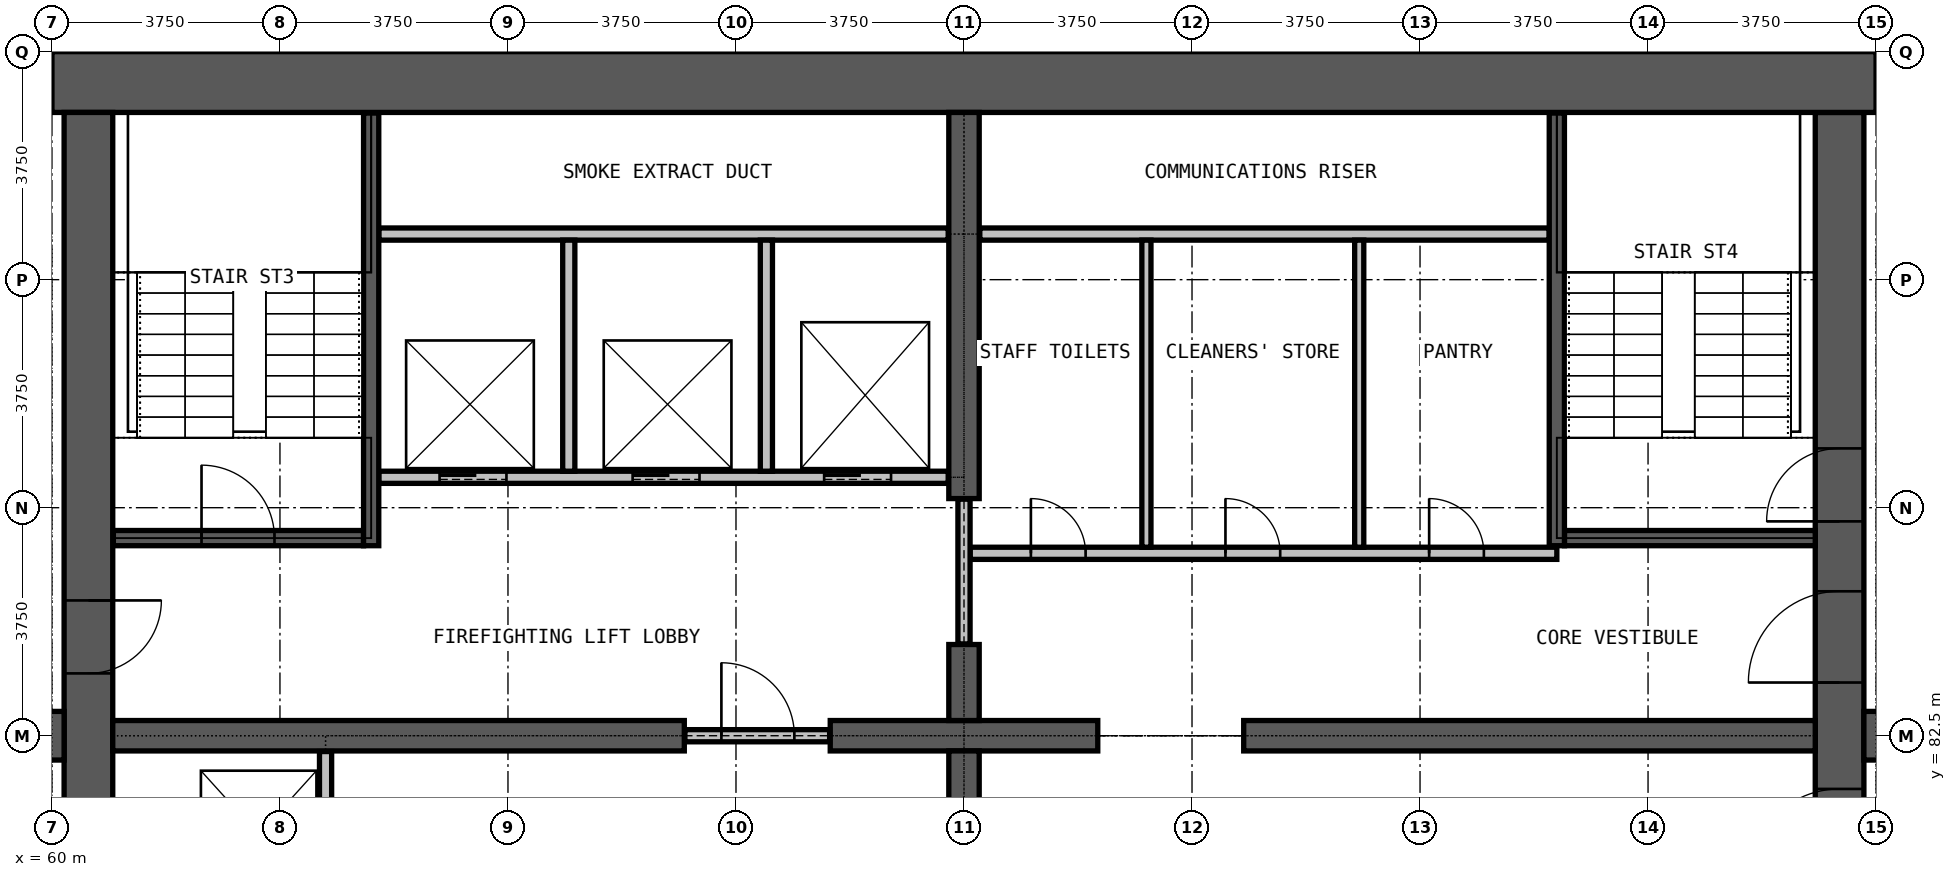
"""IFC4 building model, lengths in metres.
Left out: names, types, materials, properties, quantities, classifications, styles, units other than length and angle.
Written with IfcOpenShell. Run it as: python <this file> out.ifc"""

import sys

from ifc_helpers import new_model, si_unit, direction, frame, frame_2d, origin, place, context, subcontext, project, spatial, rectangle, extrude, element, fill, save


model = new_model("IFC4")
c1 = context("Model", 3, precision=1e-05, world=origin(), true_north=direction((0.0, 1.0)))
c2 = subcontext(c1, "Body", "Model", "MODEL_VIEW")
j1 = project(units=[si_unit("LENGTHUNIT", "METRE"), si_unit("PLANEANGLEUNIT", "RADIAN")], contexts=[c1])
p1 = place(None, origin())
s1 = spatial("IfcSite", under=j1, at=p1, CompositionType="ELEMENT")
p2 = place(p1, origin())
s2 = spatial("IfcBuilding", under=s1, at=p2, CompositionType="ELEMENT")
p3 = place(p2, frame((0.0, 0.0, 102.2)))
s3 = spatial("IfcBuildingStorey", under=s2, at=p3, CompositionType="ELEMENT", Elevation=102.2)
p4 = place(p3, frame((89.4, 72.25, 0.0), z_axis=(0.0, 0.0, 1.0), x_axis=(0.0, 1.0, 0.0)))
e1 = element("IfcWall", 1, at=p4, inside=s3, PredefinedType="SHEAR", context=c2, shape_type="SweptSolid", body=[
    extrude(rectangle(XDim=20.5, YDim=0.8, at=frame_2d((10.25, 0.0))), origin(), (0.0, 0.0, 1.0), 5.0),
])
p5 = place(p4, frame((0.275, 0.0, 0.0)))
e2 = element("IfcOpeningElement", 2, at=p5, cuts=e1, PredefinedType="OPENING", context=c2, shape_type="SweptSolid", body=[
    extrude(rectangle(XDim=1.2, YDim=2.2, at=frame_2d((0.6, 1.1))), frame((0.0, 0.41, 0.0), z_axis=(0.0, -1.0, 0.0), x_axis=(1.0, 0.0, 0.0)), (0.0, 0.0, 1.0), 0.82),
])
p6 = place(p4, frame((13.775, 0.0, 0.0)))
e3 = element("IfcOpeningElement", 3, at=p6, cuts=e1, PredefinedType="OPENING", context=c2, shape_type="SweptSolid", body=[
    extrude(rectangle(XDim=1.2, YDim=2.2, at=frame_2d((0.6, 1.1))), frame((0.0, 0.41, 0.0), z_axis=(0.0, -1.0, 0.0), x_axis=(1.0, 0.0, 0.0)), (0.0, 0.0, 1.0), 0.82),
])
p7 = place(p4, frame((7.875, 0.0, 0.0)))
e4 = element("IfcOpeningElement", 4, at=p7, cuts=e1, PredefinedType="OPENING", context=c2, shape_type="SweptSolid", body=[
    extrude(rectangle(XDim=1.5, YDim=2.2, at=frame_2d((0.75, 1.1))), frame((0.0, 0.41, 0.0), z_axis=(0.0, -1.0, 0.0), x_axis=(1.0, 0.0, 0.0)), (0.0, 0.0, 1.0), 0.82),
])
p8 = place(p4, frame((11.125, 0.0, 0.0)))
e5 = element("IfcOpeningElement", 5, at=p8, cuts=e1, PredefinedType="OPENING", context=c2, shape_type="SweptSolid", body=[
    extrude(rectangle(XDim=1.5, YDim=2.2, at=frame_2d((0.75, 1.1))), frame((0.0, 0.41, 0.0), z_axis=(0.0, -1.0, 0.0), x_axis=(1.0, 0.0, 0.0)), (0.0, 0.0, 1.0), 0.82),
])
p9 = place(p3, frame((90.0, 93.25, 0.0), z_axis=(0.0, 0.0, 1.0), x_axis=(-1.0, 0.0, 0.0)))
e6 = element("IfcWall", 6, at=p9, inside=s3, PredefinedType="SHEAR", context=c2, shape_type="SweptSolid", body=[
    extrude(rectangle(XDim=30.0, YDim=1.0, at=frame_2d((15.0, 0.0))), origin(), (0.0, 0.0, 1.0), 5.0),
])
p10 = place(p3, frame((60.6, 92.75, 0.0), z_axis=(0.0, 0.0, 1.0), x_axis=(0.0, -1.0, 0.0)))
e7 = element("IfcWall", 7, at=p10, inside=s3, PredefinedType="SHEAR", context=c2, shape_type="SweptSolid", body=[
    extrude(rectangle(XDim=20.5, YDim=0.8, at=frame_2d((10.25, 0.0))), origin(), (0.0, 0.0, 1.0), 5.0),
])
p11 = place(p10, frame((19.025, 0.0, 0.0)))
e8 = element("IfcOpeningElement", 8, at=p11, cuts=e7, PredefinedType="OPENING", context=c2, shape_type="SweptSolid", body=[
    extrude(rectangle(XDim=1.2, YDim=2.2, at=frame_2d((0.6, 1.1))), frame((0.0, 0.41, 0.0), z_axis=(0.0, -1.0, 0.0), x_axis=(1.0, 0.0, 0.0)), (0.0, 0.0, 1.0), 0.82),
])
p12 = place(p10, frame((8.025, 0.0, 0.0)))
e9 = element("IfcOpeningElement", 9, at=p12, cuts=e7, PredefinedType="OPENING", context=c2, shape_type="SweptSolid", body=[
    extrude(rectangle(XDim=1.2, YDim=2.2, at=frame_2d((0.6, 1.1))), frame((0.0, 0.41, 0.0), z_axis=(0.0, -1.0, 0.0), x_axis=(1.0, 0.0, 0.0)), (0.0, 0.0, 1.0), 0.82),
])
p13 = place(p3, frame((61.0, 82.5, 0.0), z_axis=(0.0, 0.0, 1.0), x_axis=(1.0, 0.0, 0.0)))
e10 = element("IfcWall", 10, at=p13, inside=s3, PredefinedType="SHEAR", context=c2, shape_type="SweptSolid", body=[
    extrude(rectangle(XDim=9.4, YDim=0.5, at=frame_2d((4.7, 0.0))), origin(), (0.0, 0.0, 1.0), 5.0),
])
p14 = place(p3, frame((72.8, 82.5, 0.0), z_axis=(0.0, 0.0, 1.0), x_axis=(1.0, 0.0, 0.0)))
e11 = element("IfcWall", 11, at=p14, inside=s3, PredefinedType="SHEAR", context=c2, shape_type="SweptSolid", body=[
    extrude(rectangle(XDim=4.4, YDim=0.5, at=frame_2d((2.2, 0.0))), origin(), (0.0, 0.0, 1.0), 5.0),
])
p15 = place(p3, frame((79.6, 82.5, 0.0), z_axis=(0.0, 0.0, 1.0), x_axis=(1.0, 0.0, 0.0)))
e12 = element("IfcWall", 12, at=p15, inside=s3, PredefinedType="SHEAR", context=c2, shape_type="SweptSolid", body=[
    extrude(rectangle(XDim=9.4, YDim=0.5, at=frame_2d((4.7, 0.0))), origin(), (0.0, 0.0, 1.0), 5.0),
])
for number, where, z_axis, x_axis in (
    (13, (75.0, 81.0, 0.0), (0.0, 0.0, 1.0), (0.0, 1.0, 0.0)),
    (14, (75.0, 82.75, 0.0), (0.0, 0.0, 1.0), (0.0, 1.0, 0.0)),
):
    element("IfcWall", number, at=place(p3, frame(where, z_axis=z_axis, x_axis=x_axis)), inside=s3, PredefinedType="SHEAR", context=c2, shape_type="SweptSolid", body=[
        extrude(rectangle(XDim=1.25, YDim=0.5, at=frame_2d((0.625, 0.0))), origin(), (0.0, 0.0, 1.0), 5.0),
    ])
p16 = place(p3, frame((75.0, 86.4, 0.0), z_axis=(0.0, 0.0, 1.0), x_axis=(0.0, 1.0, 0.0)))
e15 = element("IfcWall", 15, at=p16, inside=s3, PredefinedType="SHEAR", context=c2, shape_type="SweptSolid", body=[
    extrude(rectangle(XDim=6.35, YDim=0.5, at=frame_2d((3.175, 0.0))), origin(), (0.0, 0.0, 1.0), 5.0),
])
for number, where, z_axis, x_axis in (
    (16, (89.8, 82.5, 0.0), (0.0, 0.0, 1.0), (1.0, 0.0, 0.0)),
    (17, (57.875, 82.5, 0.0), (0.0, 0.0, 1.0), (1.0, 0.0, 0.0)),
):
    element("IfcWall", number, at=place(p3, frame(where, z_axis=z_axis, x_axis=x_axis)), inside=s3, PredefinedType="SHEAR", context=c2, shape_type="SweptSolid", body=[
        extrude(rectangle(XDim=2.325, YDim=0.8, at=frame_2d((1.163, 0.0))), origin(), (0.0, 0.0, 1.0), 4.7),
    ])
p17 = place(p3, frame((70.41, 82.5, 0.0), z_axis=(0.0, 0.0, 1.0), x_axis=(1.0, 0.0, 0.0)))
e18 = element("IfcWall", 18, at=p17, inside=s3, PredefinedType="PARTITIONING", context=c2, shape_type="SweptSolid", body=[
    extrude(rectangle(XDim=2.38, YDim=0.2, at=frame_2d((1.19, 0.0))), origin(), (0.0, 0.0, 1.0), 2.4),
])
p18 = place(p17, frame((0.6, 0.0, 0.0)))
e19 = element("IfcOpeningElement", 19, at=p18, cuts=e18, PredefinedType="OPENING", context=c2, shape_type="SweptSolid", body=[
    extrude(rectangle(XDim=1.2, YDim=2.2, at=frame_2d((0.6, 1.1))), frame((0.0, 0.11, 0.0), z_axis=(0.0, -1.0, 0.0), x_axis=(1.0, 0.0, 0.0)), (0.0, 0.0, 1.0), 0.22),
])
p19 = place(p3, frame((75.1, 85.5, 0.0), z_axis=(0.0, 0.0, 1.0), x_axis=(1.0, 0.0, 0.0)))
e20 = element("IfcWall", 20, at=p19, inside=s3, PredefinedType="PARTITIONING", context=c2, shape_type="SweptSolid", body=[
    extrude(rectangle(XDim=9.65, YDim=0.2, at=frame_2d((4.825, 0.0))), origin(), (0.0, 0.0, 1.0), 4.7),
])
p20 = place(p19, frame((1.0, 0.0, 0.0)))
e21 = element("IfcOpeningElement", 21, at=p20, cuts=e20, PredefinedType="OPENING", context=c2, shape_type="SweptSolid", body=[
    extrude(rectangle(XDim=0.9, YDim=2.2, at=frame_2d((0.45, 1.1))), frame((0.0, 0.11, 0.0), z_axis=(0.0, -1.0, 0.0), x_axis=(1.0, 0.0, 0.0)), (0.0, 0.0, 1.0), 0.22),
])
p21 = place(p19, frame((4.2, 0.0, 0.0)))
e22 = element("IfcOpeningElement", 22, at=p21, cuts=e20, PredefinedType="OPENING", context=c2, shape_type="SweptSolid", body=[
    extrude(rectangle(XDim=0.9, YDim=2.2, at=frame_2d((0.45, 1.1))), frame((0.0, 0.11, 0.0), z_axis=(0.0, -1.0, 0.0), x_axis=(1.0, 0.0, 0.0)), (0.0, 0.0, 1.0), 0.22),
])
p22 = place(p19, frame((7.55, 0.0, 0.0)))
e23 = element("IfcOpeningElement", 23, at=p22, cuts=e20, PredefinedType="OPENING", context=c2, shape_type="SweptSolid", body=[
    extrude(rectangle(XDim=0.9, YDim=2.2, at=frame_2d((0.45, 1.1))), frame((0.0, 0.11, 0.0), z_axis=(0.0, -1.0, 0.0), x_axis=(1.0, 0.0, 0.0)), (0.0, 0.0, 1.0), 0.22),
])
p23 = place(p3, frame((75.26, 90.75, 0.0), z_axis=(0.0, 0.0, 1.0), x_axis=(1.0, 0.0, 0.0)))
e24 = element("IfcWall", 24, at=p23, inside=s3, PredefinedType="PARTITIONING", context=c2, shape_type="SweptSolid", body=[
    extrude(rectangle(XDim=9.365, YDim=0.2, at=frame_2d((4.683, 0.0))), origin(), (0.0, 0.0, 1.0), 4.7),
])
p24 = place(p3, frame((75.0, 84.01, 0.0), z_axis=(0.0, 0.0, 1.0), x_axis=(0.0, 1.0, 0.0)))
e25 = element("IfcWall", 25, at=p24, inside=s3, PredefinedType="PARTITIONING", context=c2, shape_type="SweptSolid", body=[
    extrude(rectangle(XDim=2.38, YDim=0.2, at=frame_2d((1.19, 0.0))), origin(), (0.0, 0.0, 1.0), 2.4),
])
for number, where, z_axis, x_axis in (
    (26, (78.0, 85.6, 0.0), (0.0, 0.0, 1.0), (0.0, 1.0, 0.0)),
    (27, (81.5, 85.6, 0.0), (0.0, 0.0, 1.0), (0.0, 1.0, 0.0)),
):
    element("IfcWall", number, at=place(p3, frame(where, z_axis=z_axis, x_axis=x_axis)), inside=s3, PredefinedType="PARTITIONING", context=c2, shape_type="SweptSolid", body=[
        extrude(rectangle(XDim=5.05, YDim=0.15, at=frame_2d((2.525, 0.0))), origin(), (0.0, 0.0, 1.0), 4.7),
    ])
p25 = place(p3, frame((65.375, 86.75, 0.0), z_axis=(0.0, 0.0, 1.0), x_axis=(1.0, 0.0, 0.0)))
e28 = element("IfcWall", 28, at=p25, inside=s3, PredefinedType="PARTITIONING", context=c2, shape_type="SweptSolid", body=[
    extrude(rectangle(XDim=9.365, YDim=0.2, at=frame_2d((4.683, 0.0))), origin(), (0.0, 0.0, 1.0), 4.7),
])
p26 = place(p25, frame((1.0, 0.0, 0.0)))
e29 = element("IfcOpeningElement", 29, at=p26, cuts=e28, PredefinedType="OPENING", context=c2, shape_type="SweptSolid", body=[
    extrude(rectangle(XDim=1.1, YDim=2.2, at=frame_2d((0.55, 1.1))), frame((0.0, 0.11, 0.0), z_axis=(0.0, -1.0, 0.0), x_axis=(1.0, 0.0, 0.0)), (0.0, 0.0, 1.0), 0.22),
])
p27 = place(p25, frame((4.175, 0.0, 0.0)))
e30 = element("IfcOpeningElement", 30, at=p27, cuts=e28, PredefinedType="OPENING", context=c2, shape_type="SweptSolid", body=[
    extrude(rectangle(XDim=1.1, YDim=2.2, at=frame_2d((0.55, 1.1))), frame((0.0, 0.11, 0.0), z_axis=(0.0, -1.0, 0.0), x_axis=(1.0, 0.0, 0.0)), (0.0, 0.0, 1.0), 0.22),
])
p28 = place(p25, frame((7.325, 0.0, 0.0)))
e31 = element("IfcOpeningElement", 31, at=p28, cuts=e28, PredefinedType="OPENING", context=c2, shape_type="SweptSolid", body=[
    extrude(rectangle(XDim=1.1, YDim=2.2, at=frame_2d((0.55, 1.1))), frame((0.0, 0.11, 0.0), z_axis=(0.0, -1.0, 0.0), x_axis=(1.0, 0.0, 0.0)), (0.0, 0.0, 1.0), 0.22),
])
p29 = place(p3, frame((65.375, 90.75, 0.0), z_axis=(0.0, 0.0, 1.0), x_axis=(1.0, 0.0, 0.0)))
e32 = element("IfcWall", 32, at=p29, inside=s3, PredefinedType="PARTITIONING", context=c2, shape_type="SweptSolid", body=[
    extrude(rectangle(XDim=9.365, YDim=0.2, at=frame_2d((4.683, 0.0))), origin(), (0.0, 0.0, 1.0), 4.7),
])
p30 = place(p3, frame((64.5, 79.375, 0.0), z_axis=(0.0, 0.0, 1.0), x_axis=(0.0, 1.0, 0.0)))
e33 = element("IfcWall", 33, at=p30, inside=s3, PredefinedType="PARTITIONING", context=c2, shape_type="SweptSolid", body=[
    extrude(rectangle(XDim=2.865, YDim=0.2, at=frame_2d((1.433, 0.0))), origin(), (0.0, 0.0, 1.0), 4.7),
])
for number, where, z_axis, x_axis in (
    (34, (68.5, 86.85, 0.0), (0.0, 0.0, 1.0), (0.0, 1.0, 0.0)),
    (35, (71.75, 86.85, 0.0), (0.0, 0.0, 1.0), (0.0, 1.0, 0.0)),
):
    element("IfcWall", number, at=place(p3, frame(where, z_axis=z_axis, x_axis=x_axis)), inside=s3, PredefinedType="PARTITIONING", context=c2, shape_type="SweptSolid", body=[
        extrude(rectangle(XDim=3.8, YDim=0.2, at=frame_2d((1.9, 0.0))), origin(), (0.0, 0.0, 1.0), 4.7),
    ])
p31 = place(p3, frame((61.01, 85.75, 0.0), z_axis=(0.0, 0.0, 1.0), x_axis=(1.0, 0.0, 0.0)))
e36 = element("IfcWall", 36, at=p31, inside=s3, PredefinedType="PARTITIONING", context=c2, shape_type="SweptSolid", body=[
    extrude(rectangle(XDim=4.115, YDim=0.25, at=frame_2d((2.058, 0.0))), origin(), (0.0, 0.0, 1.0), 4.7),
])
p32 = place(p31, frame((1.45, 0.0, 0.0)))
e37 = element("IfcOpeningElement", 37, at=p32, cuts=e36, PredefinedType="OPENING", context=c2, shape_type="SweptSolid", body=[
    extrude(rectangle(XDim=1.2, YDim=2.2, at=frame_2d((0.6, 1.1))), frame((0.0, 0.135, 0.0), z_axis=(0.0, -1.0, 0.0), x_axis=(1.0, 0.0, 0.0)), (0.0, 0.0, 1.0), 0.27),
])
p33 = place(p3, frame((84.875, 85.75, 0.0), z_axis=(0.0, 0.0, 1.0), x_axis=(1.0, 0.0, 0.0)))
e38 = element("IfcWall", 38, at=p33, inside=s3, PredefinedType="PARTITIONING", context=c2, shape_type="SweptSolid", body=[
    extrude(rectangle(XDim=4.125, YDim=0.25, at=frame_2d((2.062, 0.0))), origin(), (0.0, 0.0, 1.0), 4.7),
])
for number, where, z_axis, x_axis in (
    (39, (65.25, 85.625, 0.0), (0.0, 0.0, 1.0), (0.0, 1.0, 0.0)),
    (40, (84.75, 85.625, 0.0), (0.0, 0.0, 1.0), (0.0, 1.0, 0.0)),
):
    element("IfcWall", number, at=place(p3, frame(where, z_axis=z_axis, x_axis=x_axis)), inside=s3, PredefinedType="PARTITIONING", context=c2, shape_type="SweptSolid", body=[
        extrude(rectangle(XDim=7.115, YDim=0.25, at=frame_2d((3.558, 0.0))), origin(), (0.0, 0.0, 1.0), 4.7),
    ])
p34 = place(p26, origin())
e41 = element("IfcDoor", 41, at=p34, inside=s3, OperationType="DOUBLE_DOOR_SLIDING", PredefinedType="DOOR", context=c2, shape_type="SweptSolid", body=[
    extrude(rectangle(XDim=1.1, YDim=2.2, at=frame_2d((0.55, 1.1))), frame((0.0, 0.025, 0.0), z_axis=(0.0, -1.0, 0.0), x_axis=(1.0, 0.0, 0.0)), (0.0, 0.0, 1.0), 0.05),
])
fill(e29, e41)
p35 = place(p27, origin())
e42 = element("IfcDoor", 42, at=p35, inside=s3, OperationType="DOUBLE_DOOR_SLIDING", PredefinedType="DOOR", context=c2, shape_type="SweptSolid", body=[
    extrude(rectangle(XDim=1.1, YDim=2.2, at=frame_2d((0.55, 1.1))), frame((0.0, 0.025, 0.0), z_axis=(0.0, -1.0, 0.0), x_axis=(1.0, 0.0, 0.0)), (0.0, 0.0, 1.0), 0.05),
])
fill(e30, e42)
p36 = place(p28, origin())
e43 = element("IfcDoor", 43, at=p36, inside=s3, OperationType="DOUBLE_DOOR_SLIDING", PredefinedType="DOOR", context=c2, shape_type="SweptSolid", body=[
    extrude(rectangle(XDim=1.1, YDim=2.2, at=frame_2d((0.55, 1.1))), frame((0.0, 0.025, 0.0), z_axis=(0.0, -1.0, 0.0), x_axis=(1.0, 0.0, 0.0)), (0.0, 0.0, 1.0), 0.05),
])
fill(e31, e43)
p37 = place(p18, origin())
e44 = element("IfcDoor", 44, at=p37, inside=s3, OperationType="SINGLE_SWING_LEFT", PredefinedType="DOOR", context=c2, shape_type="SweptSolid", body=[
    extrude(rectangle(XDim=1.2, YDim=2.2, at=frame_2d((0.6, 1.1))), frame((0.0, 0.025, 0.0), z_axis=(0.0, -1.0, 0.0), x_axis=(1.0, 0.0, 0.0)), (0.0, 0.0, 1.0), 0.05),
])
fill(e19, e44)
p38 = place(p32, origin())
e45 = element("IfcDoor", 45, at=p38, inside=s3, OperationType="SINGLE_SWING_LEFT", PredefinedType="DOOR", context=c2, shape_type="SweptSolid", body=[
    extrude(rectangle(XDim=1.2, YDim=2.2, at=frame_2d((0.6, 1.1))), frame((0.0, 0.025, 0.0), z_axis=(0.0, -1.0, 0.0), x_axis=(1.0, 0.0, 0.0)), (0.0, 0.0, 1.0), 0.05),
])
fill(e37, e45)
p39 = place(p6, origin())
e46 = element("IfcDoor", 46, at=p39, inside=s3, OperationType="SINGLE_SWING_LEFT", PredefinedType="DOOR", context=c2, shape_type="SweptSolid", body=[
    extrude(rectangle(XDim=1.2, YDim=2.2, at=frame_2d((0.6, 1.1))), frame((0.0, 0.025, 0.0), z_axis=(0.0, -1.0, 0.0), x_axis=(1.0, 0.0, 0.0)), (0.0, 0.0, 1.0), 0.05),
])
fill(e3, e46)
p40 = place(p7, origin())
e47 = element("IfcDoor", 47, at=p40, inside=s3, OperationType="DOUBLE_DOOR_SINGLE_SWING", PredefinedType="DOOR", context=c2, shape_type="SweptSolid", body=[
    extrude(rectangle(XDim=1.5, YDim=2.2, at=frame_2d((0.75, 1.1))), frame((0.0, 0.025, 0.0), z_axis=(0.0, -1.0, 0.0), x_axis=(1.0, 0.0, 0.0)), (0.0, 0.0, 1.0), 0.05),
])
fill(e4, e47)
p41 = place(p12, origin())
e48 = element("IfcDoor", 48, at=p41, inside=s3, OperationType="SINGLE_SWING_LEFT", PredefinedType="DOOR", context=c2, shape_type="SweptSolid", body=[
    extrude(rectangle(XDim=1.2, YDim=2.2, at=frame_2d((0.6, 1.1))), frame((0.0, 0.025, 0.0), z_axis=(0.0, -1.0, 0.0), x_axis=(1.0, 0.0, 0.0)), (0.0, 0.0, 1.0), 0.05),
])
fill(e9, e48)
p42 = place(p8, origin())
e49 = element("IfcDoor", 49, at=p42, inside=s3, OperationType="DOUBLE_DOOR_SINGLE_SWING", PredefinedType="DOOR", context=c2, shape_type="SweptSolid", body=[
    extrude(rectangle(XDim=1.5, YDim=2.2, at=frame_2d((0.75, 1.1))), frame((0.0, 0.025, 0.0), z_axis=(0.0, -1.0, 0.0), x_axis=(1.0, 0.0, 0.0)), (0.0, 0.0, 1.0), 0.05),
])
fill(e5, e49)
p43 = place(p20, origin())
e50 = element("IfcDoor", 50, at=p43, inside=s3, OperationType="SINGLE_SWING_LEFT", PredefinedType="DOOR", context=c2, shape_type="SweptSolid", body=[
    extrude(rectangle(XDim=0.9, YDim=2.2, at=frame_2d((0.45, 1.1))), frame((0.0, 0.025, 0.0), z_axis=(0.0, -1.0, 0.0), x_axis=(1.0, 0.0, 0.0)), (0.0, 0.0, 1.0), 0.05),
])
fill(e21, e50)
p44 = place(p21, origin())
e51 = element("IfcDoor", 51, at=p44, inside=s3, OperationType="SINGLE_SWING_LEFT", PredefinedType="DOOR", context=c2, shape_type="SweptSolid", body=[
    extrude(rectangle(XDim=0.9, YDim=2.2, at=frame_2d((0.45, 1.1))), frame((0.0, 0.025, 0.0), z_axis=(0.0, -1.0, 0.0), x_axis=(1.0, 0.0, 0.0)), (0.0, 0.0, 1.0), 0.05),
])
fill(e22, e51)
p45 = place(p22, origin())
e52 = element("IfcDoor", 52, at=p45, inside=s3, OperationType="SINGLE_SWING_RIGHT", PredefinedType="DOOR", context=c2, shape_type="SweptSolid", body=[
    extrude(rectangle(XDim=0.9, YDim=2.2, at=frame_2d((0.45, 1.1))), frame((0.0, 0.025, 0.0), z_axis=(0.0, -1.0, 0.0), x_axis=(1.0, 0.0, 0.0)), (0.0, 0.0, 1.0), 0.05),
])
fill(e23, e52)
save(model, sys.argv[1])
